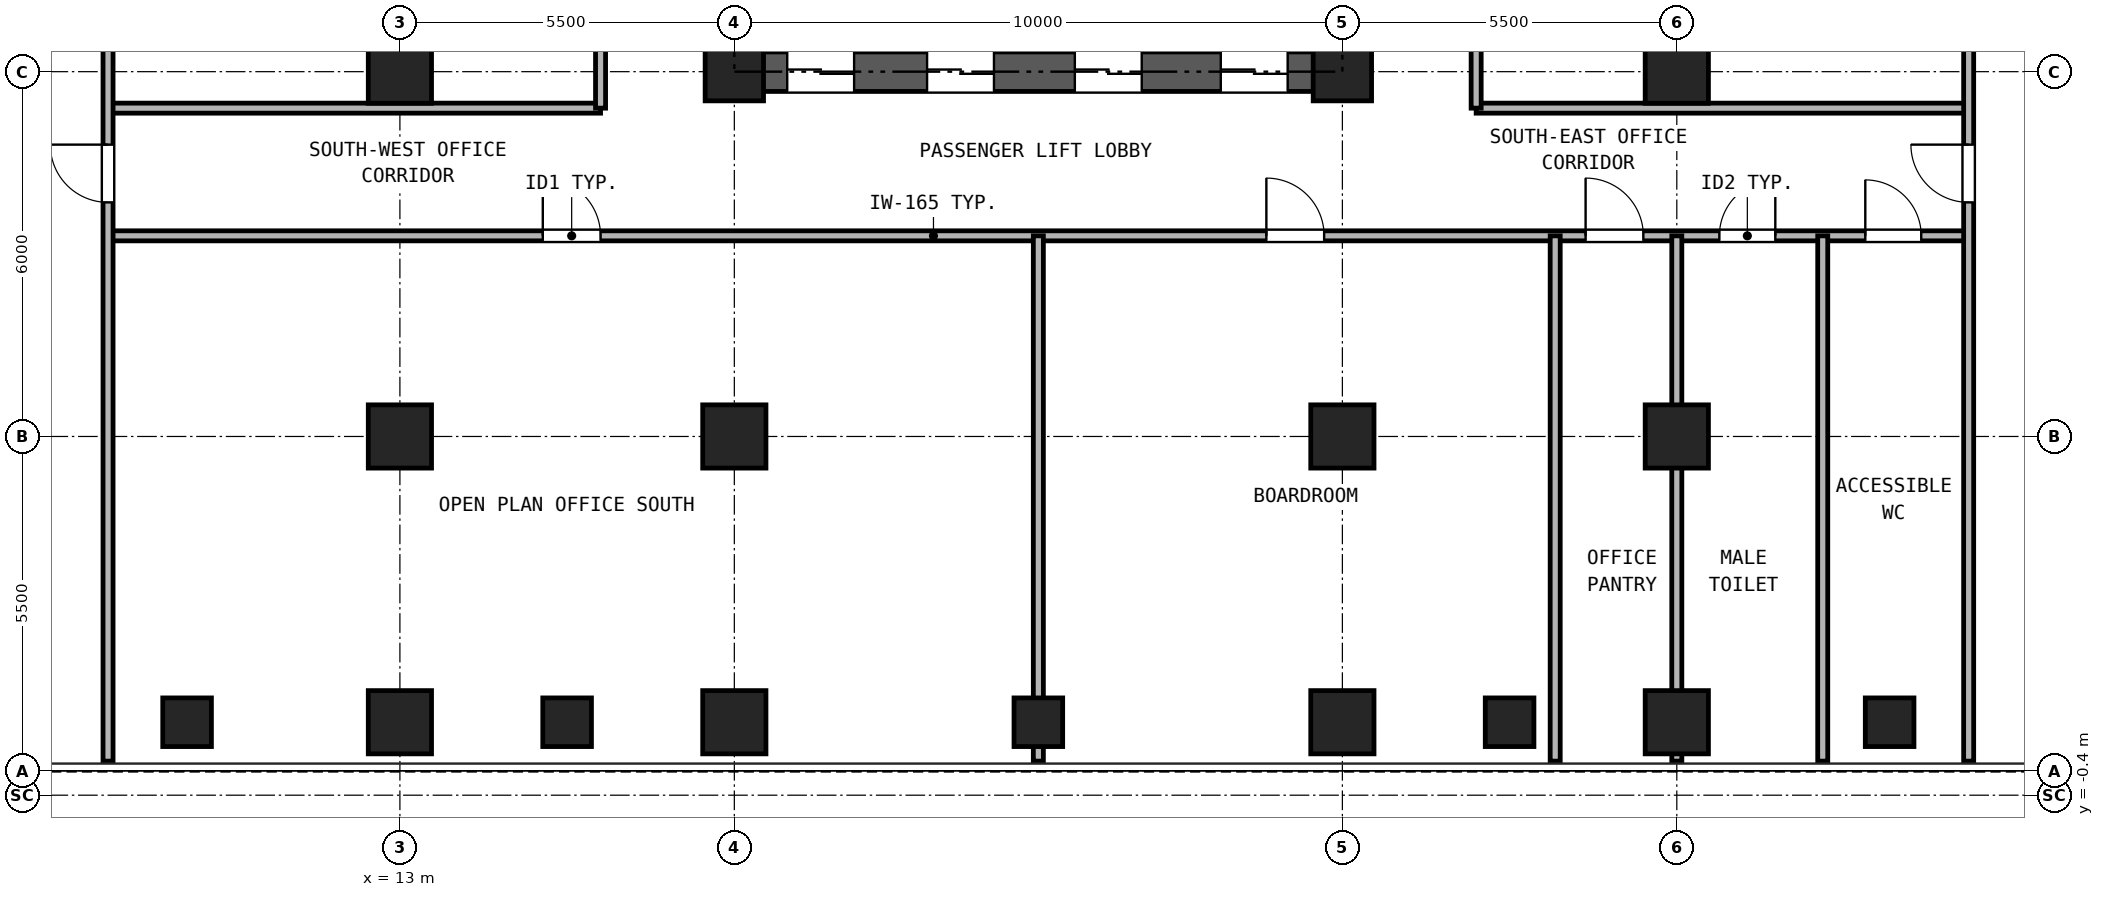
"""IFC4 building model, lengths in metres.
Left out: names, types, materials, properties, quantities, classifications, styles, units other than length and angle.
Written with IfcOpenShell. Run it as: python <this file> out.ifc"""

import sys

from ifc_helpers import new_model, si_unit, direction, frame, frame_2d, origin, origin_2d, place, context, subcontext, project, spatial, rectangle, hollow_rectangle, extrude, source, transform, mapped, element, fill, save


model = new_model("IFC4")
c1 = context("Model", 3, precision=1e-05, world=origin(), true_north=direction((0.0, 1.0)))
c2 = subcontext(c1, "Body", "Model", "MODEL_VIEW")
j1 = project(units=[si_unit("LENGTHUNIT", "METRE"), si_unit("PLANEANGLEUNIT", "RADIAN")], contexts=[c1])
p1 = place(None, origin())
s1 = spatial("IfcSite", under=j1, at=p1, CompositionType="ELEMENT")
p2 = place(p1, origin())
s2 = spatial("IfcBuilding", under=s1, at=p2, CompositionType="ELEMENT")
p3 = place(p2, frame((0.0, 0.0, 26.1)))
s3 = spatial("IfcBuildingStorey", under=s2, at=p3, CompositionType="ELEMENT", Elevation=26.1)
m1 = source(origin(), c2, "Body", "SweptSolid", [
    extrude(hollow_rectangle(XDim=1.04, YDim=1.04, WallThickness=0.065, at=origin_2d()), origin(), (0.0, 0.0, 1.0), 3.32),
])
for number, where, z_axis, x_axis in (
    (1, (13.0, 0.8, 0.0), (0.0, 0.0, 1.0), (1.0, 0.0, 0.0)),
    (2, (18.5, 0.8, 0.0), (0.0, 0.0, 1.0), (1.0, 0.0, 0.0)),
    (3, (28.5, 0.8, 0.0), (0.0, 0.0, 1.0), (1.0, 0.0, 0.0)),
    (4, (34.0, 0.8, 0.0), (0.0, 0.0, 1.0), (1.0, 0.0, 0.0)),
    (5, (13.0, 5.5, 0.0), (0.0, 0.0, 1.0), (1.0, 0.0, 0.0)),
    (6, (13.0, 11.5, 0.0), (0.0, 0.0, 1.0), (1.0, 0.0, 0.0)),
    (7, (18.5, 5.5, 0.0), (0.0, 0.0, 1.0), (1.0, 0.0, 0.0)),
):
    element("IfcColumn", number, at=place(p3, frame(where, z_axis=z_axis, x_axis=x_axis)), inside=s3, PredefinedType="COLUMN", context=c2, shape_type="MappedRepresentation", body=[
        mapped(m1, transform((0.0, 0.0, 0.0), x_axis=(1.0, 0.0, 0.0), y_axis=(0.0, 1.0, 0.0), z_axis=(0.0, 0.0, 1.0), scale=1.0)),
    ])
m2 = source(origin(), c2, "Body", "SweptSolid", [
    extrude(hollow_rectangle(XDim=0.96, YDim=0.96, WallThickness=0.06, at=origin_2d()), origin(), (0.0, 0.0, 1.0), 3.32),
])
p4 = place(p3, frame((18.5, 11.5, 0.0), z_axis=(0.0, 0.0, 1.0), x_axis=(1.0, 0.0, 0.0)))
e8 = element("IfcColumn", 8, at=p4, inside=s3, PredefinedType="COLUMN", context=c2, shape_type="MappedRepresentation", body=[
    mapped(m2, transform((0.0, 0.0, 0.0), x_axis=(1.0, 0.0, 0.0), y_axis=(0.0, 1.0, 0.0), z_axis=(0.0, 0.0, 1.0), scale=1.0)),
])
p5 = place(p3, frame((28.5, 5.5, 0.0), z_axis=(0.0, 0.0, 1.0), x_axis=(1.0, 0.0, 0.0)))
e9 = element("IfcColumn", 9, at=p5, inside=s3, PredefinedType="COLUMN", context=c2, shape_type="MappedRepresentation", body=[
    mapped(m1, transform((0.0, 0.0, 0.0), x_axis=(1.0, 0.0, 0.0), y_axis=(0.0, 1.0, 0.0), z_axis=(0.0, 0.0, 1.0), scale=1.0)),
])
p6 = place(p3, frame((28.5, 11.5, 0.0), z_axis=(0.0, 0.0, 1.0), x_axis=(1.0, 0.0, 0.0)))
e10 = element("IfcColumn", 10, at=p6, inside=s3, PredefinedType="COLUMN", context=c2, shape_type="MappedRepresentation", body=[
    mapped(m2, transform((0.0, 0.0, 0.0), x_axis=(1.0, 0.0, 0.0), y_axis=(0.0, 1.0, 0.0), z_axis=(0.0, 0.0, 1.0), scale=1.0)),
])
for number, where, z_axis, x_axis in (
    (11, (34.0, 5.5, 0.0), (0.0, 0.0, 1.0), (1.0, 0.0, 0.0)),
    (12, (34.0, 11.5, 0.0), (0.0, 0.0, 1.0), (1.0, 0.0, 0.0)),
):
    element("IfcColumn", number, at=place(p3, frame(where, z_axis=z_axis, x_axis=x_axis)), inside=s3, PredefinedType="COLUMN", context=c2, shape_type="MappedRepresentation", body=[
        mapped(m1, transform((0.0, 0.0, 0.0), x_axis=(1.0, 0.0, 0.0), y_axis=(0.0, 1.0, 0.0), z_axis=(0.0, 0.0, 1.0), scale=1.0)),
    ])
m3 = source(origin(), c2, "Body", "SweptSolid", [
    extrude(hollow_rectangle(XDim=0.8, YDim=0.8, WallThickness=0.045, at=origin_2d()), origin(), (0.0, 0.0, 1.0), 3.32),
])
for number, where, z_axis, x_axis in (
    (13, (9.5, 0.8, 0.0), (0.0, 0.0, 1.0), (1.0, 0.0, 0.0)),
    (14, (15.75, 0.8, 0.0), (0.0, 0.0, 1.0), (1.0, 0.0, 0.0)),
    (15, (23.5, 0.8, 0.0), (0.0, 0.0, 1.0), (1.0, 0.0, 0.0)),
    (16, (31.25, 0.8, 0.0), (0.0, 0.0, 1.0), (1.0, 0.0, 0.0)),
    (17, (37.5, 0.8, 0.0), (0.0, 0.0, 1.0), (1.0, 0.0, 0.0)),
):
    element("IfcColumn", number, at=place(p3, frame(where, z_axis=z_axis, x_axis=x_axis)), inside=s3, PredefinedType="COLUMN", context=c2, shape_type="MappedRepresentation", body=[
        mapped(m3, transform((0.0, 0.0, 0.0), x_axis=(1.0, 0.0, 0.0), y_axis=(0.0, 1.0, 0.0), z_axis=(0.0, 0.0, 1.0), scale=1.0)),
    ])
p7 = place(p3, frame((18.175, 11.5, 0.0), z_axis=(0.0, 0.0, 1.0), x_axis=(1.0, 0.0, 0.0)))
e18 = element("IfcWall", 18, at=p7, inside=s3, PredefinedType="SHEAR", context=c2, shape_type="SweptSolid", body=[
    extrude(rectangle(XDim=10.65, YDim=0.65, at=frame_2d((5.325, 0.0))), origin(), (0.0, 0.0, 1.0), 3.32),
])
p8 = place(p7, frame((1.195, 0.0, 0.0)))
e19 = element("IfcOpeningElement", 19, at=p8, cuts=e18, PredefinedType="OPENING", context=c2, shape_type="SweptSolid", body=[
    extrude(rectangle(XDim=1.1, YDim=2.25, at=frame_2d((0.55, 1.125))), frame((0.0, 0.335, 0.0), z_axis=(0.0, -1.0, 0.0), x_axis=(1.0, 0.0, 0.0)), (0.0, 0.0, 1.0), 0.67),
])
p9 = place(p7, frame((3.495, 0.0, 0.0)))
e20 = element("IfcOpeningElement", 20, at=p9, cuts=e18, PredefinedType="OPENING", context=c2, shape_type="SweptSolid", body=[
    extrude(rectangle(XDim=1.1, YDim=2.25, at=frame_2d((0.55, 1.125))), frame((0.0, 0.335, 0.0), z_axis=(0.0, -1.0, 0.0), x_axis=(1.0, 0.0, 0.0)), (0.0, 0.0, 1.0), 0.67),
])
p10 = place(p7, frame((5.925, 0.0, 0.0)))
e21 = element("IfcOpeningElement", 21, at=p10, cuts=e18, PredefinedType="OPENING", context=c2, shape_type="SweptSolid", body=[
    extrude(rectangle(XDim=1.1, YDim=2.25, at=frame_2d((0.55, 1.125))), frame((0.0, 0.335, 0.0), z_axis=(0.0, -1.0, 0.0), x_axis=(1.0, 0.0, 0.0)), (0.0, 0.0, 1.0), 0.67),
])
p11 = place(p7, frame((8.325, 0.0, 0.0)))
e22 = element("IfcOpeningElement", 22, at=p11, cuts=e18, PredefinedType="OPENING", context=c2, shape_type="SweptSolid", body=[
    extrude(rectangle(XDim=1.1, YDim=2.25, at=frame_2d((0.55, 1.125))), frame((0.0, 0.335, 0.0), z_axis=(0.0, -1.0, 0.0), x_axis=(1.0, 0.0, 0.0)), (0.0, 0.0, 1.0), 0.67),
])
p12 = place(p3, frame((8.2, 8.8, 0.0), z_axis=(0.0, 0.0, 1.0), x_axis=(1.0, 0.0, 0.0)))
e23 = element("IfcWall", 23, at=p12, inside=s3, PredefinedType="PARTITIONING", context=c2, shape_type="SweptSolid", body=[
    extrude(rectangle(XDim=30.6, YDim=0.165, at=frame_2d((15.3, 0.0))), origin(), (0.0, 0.0, 1.0), 3.32),
])
p13 = place(p12, frame((7.15, 0.0, 0.0)))
e24 = element("IfcOpeningElement", 24, at=p13, cuts=e23, PredefinedType="OPENING", context=c2, shape_type="SweptSolid", body=[
    extrude(rectangle(XDim=0.95, YDim=2.15, at=frame_2d((0.475, 1.075))), frame((0.0, 0.093, 0.0), z_axis=(0.0, -1.0, 0.0), x_axis=(1.0, 0.0, 0.0)), (0.0, 0.0, 1.0), 0.185),
])
p14 = place(p12, frame((19.05, 0.0, 0.0)))
e25 = element("IfcOpeningElement", 25, at=p14, cuts=e23, PredefinedType="OPENING", context=c2, shape_type="SweptSolid", body=[
    extrude(rectangle(XDim=0.95, YDim=2.15, at=frame_2d((0.475, 1.075))), frame((0.0, 0.093, 0.0), z_axis=(0.0, -1.0, 0.0), x_axis=(1.0, 0.0, 0.0)), (0.0, 0.0, 1.0), 0.185),
])
p15 = place(p12, frame((24.3, 0.0, 0.0)))
e26 = element("IfcOpeningElement", 26, at=p15, cuts=e23, PredefinedType="OPENING", context=c2, shape_type="SweptSolid", body=[
    extrude(rectangle(XDim=0.95, YDim=2.15, at=frame_2d((0.475, 1.075))), frame((0.0, 0.093, 0.0), z_axis=(0.0, -1.0, 0.0), x_axis=(1.0, 0.0, 0.0)), (0.0, 0.0, 1.0), 0.185),
])
p16 = place(p12, frame((26.5, 0.0, 0.0)))
e27 = element("IfcOpeningElement", 27, at=p16, cuts=e23, PredefinedType="OPENING", context=c2, shape_type="SweptSolid", body=[
    extrude(rectangle(XDim=0.92, YDim=2.1, at=frame_2d((0.46, 1.05))), frame((0.0, 0.093, 0.0), z_axis=(0.0, -1.0, 0.0), x_axis=(1.0, 0.0, 0.0)), (0.0, 0.0, 1.0), 0.185),
])
p17 = place(p12, frame((28.9, 0.0, 0.0)))
e28 = element("IfcOpeningElement", 28, at=p17, cuts=e23, PredefinedType="OPENING", context=c2, shape_type="SweptSolid", body=[
    extrude(rectangle(XDim=0.92, YDim=2.1, at=frame_2d((0.46, 1.05))), frame((0.0, 0.093, 0.0), z_axis=(0.0, -1.0, 0.0), x_axis=(1.0, 0.0, 0.0)), (0.0, 0.0, 1.0), 0.185),
])
for number, where, z_axis, x_axis in (
    (29, (8.2, 10.9, 0.0), (0.0, 0.0, 1.0), (1.0, 0.0, 0.0)),
    (30, (30.7, 10.9, 0.0), (0.0, 0.0, 1.0), (1.0, 0.0, 0.0)),
):
    element("IfcWall", number, at=place(p3, frame(where, z_axis=z_axis, x_axis=x_axis)), inside=s3, PredefinedType="PARTITIONING", context=c2, shape_type="SweptSolid", body=[
        extrude(rectangle(XDim=8.1, YDim=0.165, at=frame_2d((4.05, 0.0))), origin(), (0.0, 0.0, 1.0), 3.32),
    ])
p18 = place(p3, frame((16.3, 10.9, 0.0), z_axis=(0.0, 0.0, 1.0), x_axis=(0.0, 1.0, 0.0)))
e31 = element("IfcWall", 31, at=p18, inside=s3, PredefinedType="PARTITIONING", context=c2, shape_type="SweptSolid", body=[
    extrude(rectangle(XDim=18.35, YDim=0.165, at=frame_2d((9.175, 0.0))), origin(), (0.0, 0.0, 1.0), 3.32),
])
p19 = place(p18, frame((5.44, 0.0, 0.0)))
e32 = element("IfcOpeningElement", 32, at=p19, cuts=e31, PredefinedType="OPENING", context=c2, shape_type="SweptSolid", body=[
    extrude(rectangle(XDim=0.95, YDim=2.15, at=frame_2d((0.475, 1.075))), frame((0.0, 0.093, 0.0), z_axis=(0.0, -1.0, 0.0), x_axis=(1.0, 0.0, 0.0)), (0.0, 0.0, 1.0), 0.185),
])
p20 = place(p18, frame((14.616, 0.0, 0.0)))
e33 = element("IfcOpeningElement", 33, at=p20, cuts=e31, PredefinedType="OPENING", context=c2, shape_type="SweptSolid", body=[
    extrude(rectangle(XDim=0.95, YDim=2.15, at=frame_2d((0.475, 1.075))), frame((0.0, 0.093, 0.0), z_axis=(0.0, -1.0, 0.0), x_axis=(1.0, 0.0, 0.0)), (0.0, 0.0, 1.0), 0.185),
])
p21 = place(p3, frame((30.7, 10.9, 0.0), z_axis=(0.0, 0.0, 1.0), x_axis=(0.0, 1.0, 0.0)))
e34 = element("IfcWall", 34, at=p21, inside=s3, PredefinedType="PARTITIONING", context=c2, shape_type="SweptSolid", body=[
    extrude(rectangle(XDim=18.35, YDim=0.165, at=frame_2d((9.175, 0.0))), origin(), (0.0, 0.0, 1.0), 3.32),
])
p22 = place(p21, frame((8.675, 0.0, 0.0)))
e35 = element("IfcOpeningElement", 35, at=p22, cuts=e34, PredefinedType="OPENING", context=c2, shape_type="SweptSolid", body=[
    extrude(rectangle(XDim=0.95, YDim=2.15, at=frame_2d((0.475, 1.075))), frame((0.0, 0.093, 0.0), z_axis=(0.0, -1.0, 0.0), x_axis=(1.0, 0.0, 0.0)), (0.0, 0.0, 1.0), 0.185),
])
p23 = place(p3, frame((8.2, 0.16, 0.0), z_axis=(0.0, 0.0, 1.0), x_axis=(0.0, 1.0, 0.0)))
e36 = element("IfcWall", 36, at=p23, inside=s3, PredefinedType="PARTITIONING", context=c2, shape_type="SweptSolid", body=[
    extrude(rectangle(XDim=40.18, YDim=0.165, at=frame_2d((20.09, 0.0))), origin(), (0.0, 0.0, 1.0), 3.32),
])
p24 = place(p23, frame((9.19, 0.0, 0.0)))
e37 = element("IfcOpeningElement", 37, at=p24, cuts=e36, PredefinedType="OPENING", context=c2, shape_type="SweptSolid", body=[
    extrude(rectangle(XDim=0.95, YDim=2.15, at=frame_2d((0.475, 1.075))), frame((0.0, 0.093, 0.0), z_axis=(0.0, -1.0, 0.0), x_axis=(1.0, 0.0, 0.0)), (0.0, 0.0, 1.0), 0.185),
])
p25 = place(p23, frame((29.64, 0.0, 0.0)))
e38 = element("IfcOpeningElement", 38, at=p25, cuts=e36, PredefinedType="OPENING", context=c2, shape_type="SweptSolid", body=[
    extrude(rectangle(XDim=0.95, YDim=2.15, at=frame_2d((0.475, 1.075))), frame((0.0, 0.093, 0.0), z_axis=(0.0, -1.0, 0.0), x_axis=(1.0, 0.0, 0.0)), (0.0, 0.0, 1.0), 0.185),
])
p26 = place(p3, frame((38.8, 0.16, 0.0), z_axis=(0.0, 0.0, 1.0), x_axis=(0.0, 1.0, 0.0)))
e39 = element("IfcWall", 39, at=p26, inside=s3, PredefinedType="PARTITIONING", context=c2, shape_type="SweptSolid", body=[
    extrude(rectangle(XDim=40.18, YDim=0.165, at=frame_2d((20.09, 0.0))), origin(), (0.0, 0.0, 1.0), 3.32),
])
p27 = place(p26, frame((9.19, 0.0, 0.0)))
e40 = element("IfcOpeningElement", 40, at=p27, cuts=e39, PredefinedType="OPENING", context=c2, shape_type="SweptSolid", body=[
    extrude(rectangle(XDim=0.95, YDim=2.15, at=frame_2d((0.475, 1.075))), frame((0.0, 0.093, 0.0), z_axis=(0.0, -1.0, 0.0), x_axis=(1.0, 0.0, 0.0)), (0.0, 0.0, 1.0), 0.185),
])
p28 = place(p26, frame((29.64, 0.0, 0.0)))
e41 = element("IfcOpeningElement", 41, at=p28, cuts=e39, PredefinedType="OPENING", context=c2, shape_type="SweptSolid", body=[
    extrude(rectangle(XDim=0.95, YDim=2.15, at=frame_2d((0.475, 1.075))), frame((0.0, 0.093, 0.0), z_axis=(0.0, -1.0, 0.0), x_axis=(1.0, 0.0, 0.0)), (0.0, 0.0, 1.0), 0.185),
])
for number, where, z_axis, x_axis in (
    (42, (23.5, 0.16, 0.0), (0.0, 0.0, 1.0), (0.0, 1.0, 0.0)),
    (43, (32.0, 0.16, 0.0), (0.0, 0.0, 1.0), (0.0, 1.0, 0.0)),
):
    element("IfcWall", number, at=place(p3, frame(where, z_axis=z_axis, x_axis=x_axis)), inside=s3, PredefinedType="PARTITIONING", context=c2, shape_type="SweptSolid", body=[
        extrude(rectangle(XDim=8.64, YDim=0.165, at=frame_2d((4.32, 0.0))), origin(), (0.0, 0.0, 1.0), 3.32),
    ])
p29 = place(p3, frame((34.0, 0.16, 0.0), z_axis=(0.0, 0.0, 1.0), x_axis=(0.0, 1.0, 0.0)))
e44 = element("IfcWall", 44, at=p29, inside=s3, PredefinedType="PARTITIONING", context=c2, shape_type="SweptSolid", body=[
    extrude(rectangle(XDim=8.64, YDim=0.165, at=frame_2d((4.32, 0.0))), origin(), (0.0, 0.0, 1.0), 2.539),
])
p30 = place(p3, frame((36.4, 0.16, 0.0), z_axis=(0.0, 0.0, 1.0), x_axis=(0.0, 1.0, 0.0)))
e45 = element("IfcWall", 45, at=p30, inside=s3, PredefinedType="PARTITIONING", context=c2, shape_type="SweptSolid", body=[
    extrude(rectangle(XDim=8.64, YDim=0.165, at=frame_2d((4.32, 0.0))), origin(), (0.0, 0.0, 1.0), 3.32),
])
p31 = place(p8, frame((1.1, 0.0, 0.0), z_axis=(0.0, 0.0, 1.0), x_axis=(-1.0, 0.0, 0.0)))
e46 = element("IfcDoor", 46, at=p31, inside=s3, OperationType="DOUBLE_DOOR_SLIDING", PredefinedType="DOOR", context=c2, shape_type="SweptSolid", body=[
    extrude(rectangle(XDim=1.1, YDim=2.25, at=frame_2d((0.55, 1.125))), frame((0.0, 0.025, 0.0), z_axis=(0.0, -1.0, 0.0), x_axis=(1.0, 0.0, 0.0)), (0.0, 0.0, 1.0), 0.05),
])
fill(e19, e46)
p32 = place(p9, frame((1.1, 0.0, 0.0), z_axis=(0.0, 0.0, 1.0), x_axis=(-1.0, 0.0, 0.0)))
e47 = element("IfcDoor", 47, at=p32, inside=s3, OperationType="DOUBLE_DOOR_SLIDING", PredefinedType="DOOR", context=c2, shape_type="SweptSolid", body=[
    extrude(rectangle(XDim=1.1, YDim=2.25, at=frame_2d((0.55, 1.125))), frame((0.0, 0.025, 0.0), z_axis=(0.0, -1.0, 0.0), x_axis=(1.0, 0.0, 0.0)), (0.0, 0.0, 1.0), 0.05),
])
fill(e20, e47)
p33 = place(p10, frame((1.1, 0.0, 0.0), z_axis=(0.0, 0.0, 1.0), x_axis=(-1.0, 0.0, 0.0)))
e48 = element("IfcDoor", 48, at=p33, inside=s3, OperationType="DOUBLE_DOOR_SLIDING", PredefinedType="DOOR", context=c2, shape_type="SweptSolid", body=[
    extrude(rectangle(XDim=1.1, YDim=2.25, at=frame_2d((0.55, 1.125))), frame((0.0, 0.025, 0.0), z_axis=(0.0, -1.0, 0.0), x_axis=(1.0, 0.0, 0.0)), (0.0, 0.0, 1.0), 0.05),
])
fill(e21, e48)
p34 = place(p11, frame((1.1, 0.0, 0.0), z_axis=(0.0, 0.0, 1.0), x_axis=(-1.0, 0.0, 0.0)))
e49 = element("IfcDoor", 49, at=p34, inside=s3, OperationType="DOUBLE_DOOR_SLIDING", PredefinedType="DOOR", context=c2, shape_type="SweptSolid", body=[
    extrude(rectangle(XDim=1.1, YDim=2.25, at=frame_2d((0.55, 1.125))), frame((0.0, 0.025, 0.0), z_axis=(0.0, -1.0, 0.0), x_axis=(1.0, 0.0, 0.0)), (0.0, 0.0, 1.0), 0.05),
])
fill(e22, e49)
p35 = place(p13, frame((0.95, 0.0, 0.0), z_axis=(0.0, 0.0, 1.0), x_axis=(-1.0, 0.0, 0.0)))
e50 = element("IfcDoor", 50, at=p35, inside=s3, OperationType="SINGLE_SWING_LEFT", PredefinedType="DOOR", context=c2, shape_type="SweptSolid", body=[
    extrude(rectangle(XDim=0.95, YDim=2.15, at=frame_2d((0.475, 1.075))), frame((0.0, 0.025, 0.0), z_axis=(0.0, -1.0, 0.0), x_axis=(1.0, 0.0, 0.0)), (0.0, 0.0, 1.0), 0.05),
])
fill(e24, e50)
p36 = place(p14, frame((0.95, 0.0, 0.0), z_axis=(0.0, 0.0, 1.0), x_axis=(-1.0, 0.0, 0.0)))
e51 = element("IfcDoor", 51, at=p36, inside=s3, OperationType="SINGLE_SWING_LEFT", PredefinedType="DOOR", context=c2, shape_type="SweptSolid", body=[
    extrude(rectangle(XDim=0.95, YDim=2.15, at=frame_2d((0.475, 1.075))), frame((0.0, 0.025, 0.0), z_axis=(0.0, -1.0, 0.0), x_axis=(1.0, 0.0, 0.0)), (0.0, 0.0, 1.0), 0.05),
])
fill(e25, e51)
p37 = place(p15, frame((0.95, 0.0, 0.0), z_axis=(0.0, 0.0, 1.0), x_axis=(-1.0, 0.0, 0.0)))
e52 = element("IfcDoor", 52, at=p37, inside=s3, OperationType="SINGLE_SWING_LEFT", PredefinedType="DOOR", context=c2, shape_type="SweptSolid", body=[
    extrude(rectangle(XDim=0.95, YDim=2.15, at=frame_2d((0.475, 1.075))), frame((0.0, 0.025, 0.0), z_axis=(0.0, -1.0, 0.0), x_axis=(1.0, 0.0, 0.0)), (0.0, 0.0, 1.0), 0.05),
])
fill(e26, e52)
p38 = place(p16, frame((0.92, 0.0, 0.0), z_axis=(0.0, 0.0, 1.0), x_axis=(-1.0, 0.0, 0.0)))
e53 = element("IfcDoor", 53, at=p38, inside=s3, OperationType="SINGLE_SWING_RIGHT", PredefinedType="DOOR", context=c2, shape_type="SweptSolid", body=[
    extrude(rectangle(XDim=0.92, YDim=2.1, at=frame_2d((0.46, 1.05))), frame((0.0, 0.025, 0.0), z_axis=(0.0, -1.0, 0.0), x_axis=(1.0, 0.0, 0.0)), (0.0, 0.0, 1.0), 0.05),
])
fill(e27, e53)
p39 = place(p17, frame((0.92, 0.0, 0.0), z_axis=(0.0, 0.0, 1.0), x_axis=(-1.0, 0.0, 0.0)))
e54 = element("IfcDoor", 54, at=p39, inside=s3, OperationType="SINGLE_SWING_LEFT", PredefinedType="DOOR", context=c2, shape_type="SweptSolid", body=[
    extrude(rectangle(XDim=0.92, YDim=2.1, at=frame_2d((0.46, 1.05))), frame((0.0, 0.025, 0.0), z_axis=(0.0, -1.0, 0.0), x_axis=(1.0, 0.0, 0.0)), (0.0, 0.0, 1.0), 0.05),
])
fill(e28, e54)
p40 = place(p24, frame((0.95, 0.0, 0.0), z_axis=(0.0, 0.0, 1.0), x_axis=(-1.0, 0.0, 0.0)))
e55 = element("IfcDoor", 55, at=p40, inside=s3, OperationType="SINGLE_SWING_RIGHT", PredefinedType="DOOR", context=c2, shape_type="SweptSolid", body=[
    extrude(rectangle(XDim=0.95, YDim=2.15, at=frame_2d((0.475, 1.075))), frame((0.0, 0.025, 0.0), z_axis=(0.0, -1.0, 0.0), x_axis=(1.0, 0.0, 0.0)), (0.0, 0.0, 1.0), 0.05),
])
fill(e37, e55)
p41 = place(p27, origin())
e56 = element("IfcDoor", 56, at=p41, inside=s3, OperationType="SINGLE_SWING_RIGHT", PredefinedType="DOOR", context=c2, shape_type="SweptSolid", body=[
    extrude(rectangle(XDim=0.95, YDim=2.15, at=frame_2d((0.475, 1.075))), frame((0.0, 0.025, 0.0), z_axis=(0.0, -1.0, 0.0), x_axis=(1.0, 0.0, 0.0)), (0.0, 0.0, 1.0), 0.05),
])
fill(e40, e56)
save(model, sys.argv[1])
